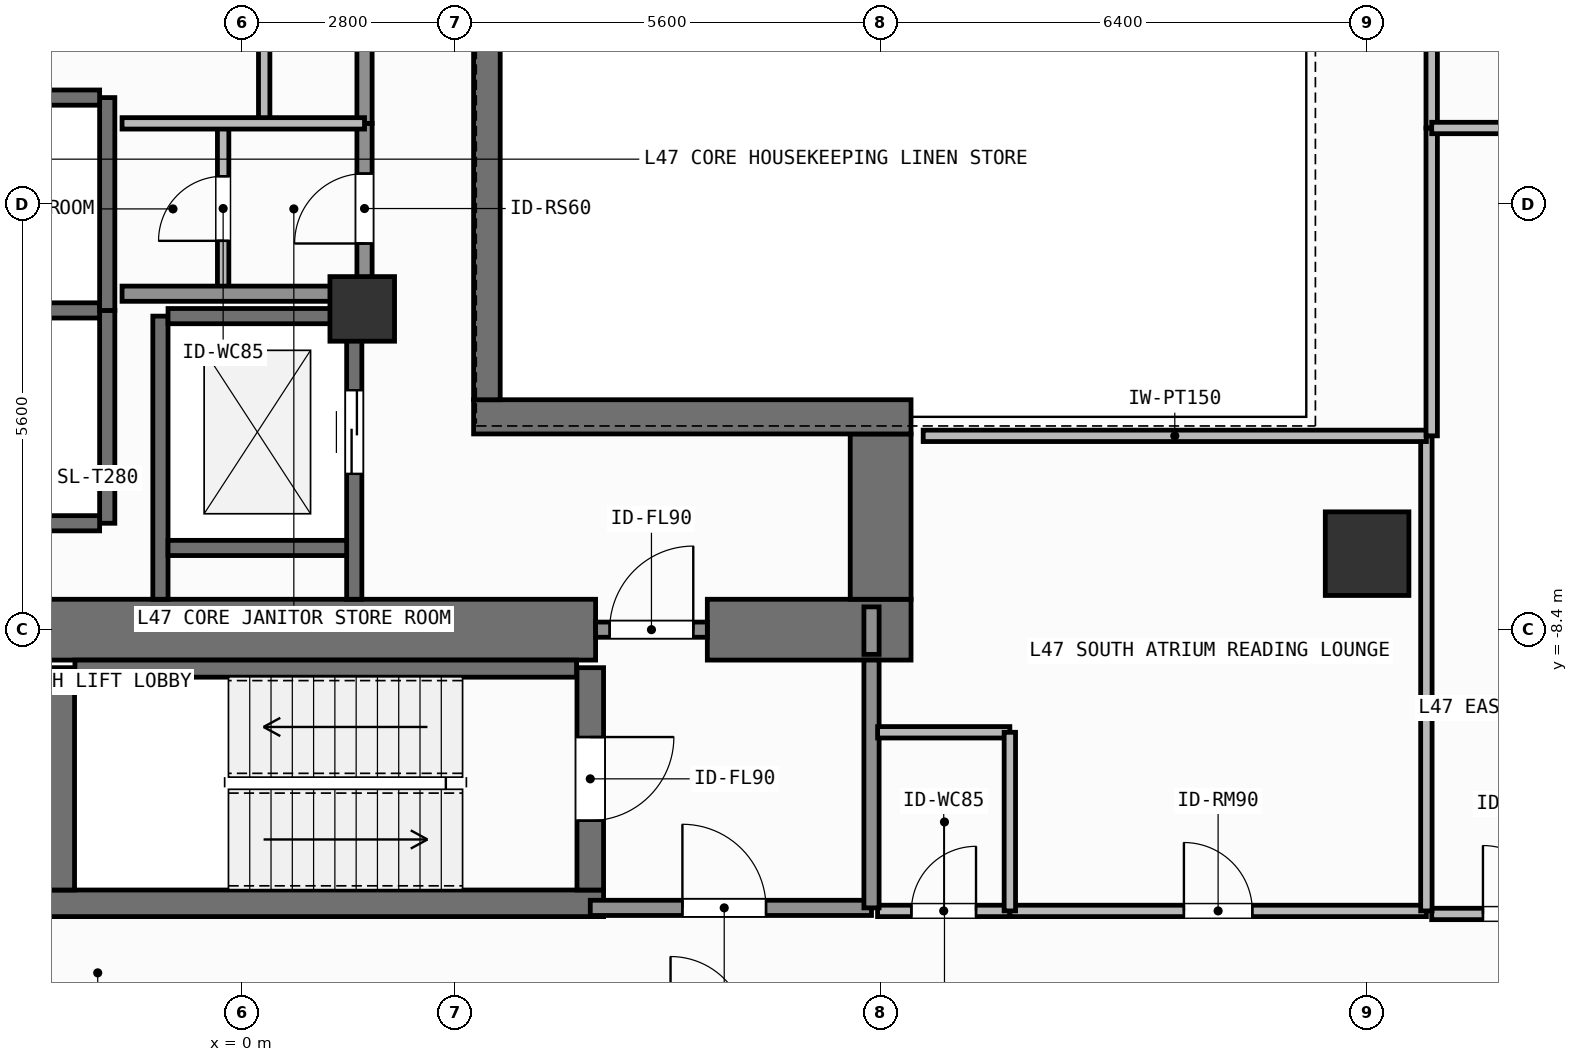
"""IFC4 building model, lengths in metres.
Left out: names, types, materials, properties, quantities, classifications, styles, units other than length and angle.
Written with IfcOpenShell. Run it as: python <this file> out.ifc"""

import sys

from ifc_helpers import new_model, si_unit, direction, frame, frame_2d, origin, origin_2d, place, context, subcontext, project, spatial, rectangle, extrude, element, fill, save


model = new_model("IFC4")
c1 = context("Model", 3, precision=1e-05, world=origin(), true_north=direction((0.0, 1.0)))
c2 = subcontext(c1, "Body", "Model", "MODEL_VIEW")
j1 = project(units=[si_unit("LENGTHUNIT", "METRE"), si_unit("PLANEANGLEUNIT", "RADIAN")], contexts=[c1])
p1 = place(None, origin())
s1 = spatial("IfcSite", under=j1, at=p1, CompositionType="ELEMENT")
p2 = place(p1, origin())
s2 = spatial("IfcBuilding", under=s1, at=p2, CompositionType="ELEMENT")
p3 = place(p2, frame((0.0, 0.0, 191.4)))
s3 = spatial("IfcBuildingStorey", under=s2, at=p3, CompositionType="ELEMENT", Elevation=191.4)
p4 = place(p3, frame((-2.62, -8.4, 0.0), z_axis=(0.0, 0.0, 1.0), x_axis=(1.0, 0.0, 0.0)))
e1 = element("IfcWall", 1, at=p4, inside=s3, PredefinedType="SHEAR", context=c2, shape_type="SweptSolid", body=[
    extrude(rectangle(XDim=7.27, YDim=0.8, at=frame_2d((3.635, 0.0))), origin(), (0.0, 0.0, 1.0), 3.9),
])
p5 = place(p3, frame((6.12, -8.4, 0.0), z_axis=(0.0, 0.0, 1.0), x_axis=(1.0, 0.0, 0.0)))
e2 = element("IfcWall", 2, at=p5, inside=s3, PredefinedType="SHEAR", context=c2, shape_type="SweptSolid", body=[
    extrude(rectangle(XDim=2.68, YDim=0.8, at=frame_2d((1.34, 0.0))), origin(), (0.0, 0.0, 1.0), 3.9),
])
p6 = place(p3, frame((8.4, -8.0, 0.0), z_axis=(0.0, 0.0, 1.0), x_axis=(0.0, 1.0, 0.0)))
e3 = element("IfcWall", 3, at=p6, inside=s3, PredefinedType="SHEAR", context=c2, shape_type="SweptSolid", body=[
    extrude(rectangle(XDim=2.175, YDim=0.8, at=frame_2d((1.087, 0.0))), origin(), (0.0, 0.0, 1.0), 3.9),
])
p7 = place(p3, frame((3.045, -5.6, 0.0), z_axis=(0.0, 0.0, 1.0), x_axis=(1.0, 0.0, 0.0)))
e4 = element("IfcWall", 4, at=p7, inside=s3, PredefinedType="SHEAR", context=c2, shape_type="SweptSolid", body=[
    extrude(rectangle(XDim=5.755, YDim=0.45, at=frame_2d((2.877, 0.0))), origin(), (0.0, 0.0, 1.0), 3.9),
])
p8 = place(p3, frame((3.22, -5.375, 0.0), z_axis=(0.0, 0.0, 1.0), x_axis=(0.0, 1.0, 0.0)))
e5 = element("IfcWall", 5, at=p8, inside=s3, PredefinedType="SHEAR", context=c2, shape_type="SweptSolid", body=[
    extrude(rectangle(XDim=10.75, YDim=0.35, at=frame_2d((5.375, 0.0))), origin(), (0.0, 0.0, 1.0), 3.9),
])
p9 = place(p3, frame((-2.555, -12.0, 0.0), z_axis=(0.0, 0.0, 1.0), x_axis=(1.0, 0.0, 0.0)))
e6 = element("IfcWall", 6, at=p9, inside=s3, PredefinedType="SHEAR", context=c2, shape_type="SweptSolid", body=[
    extrude(rectangle(XDim=7.31, YDim=0.35, at=frame_2d((3.655, 0.0))), origin(), (0.0, 0.0, 1.0), 3.9),
])
p10 = place(p3, frame((-2.2, -8.913, 0.0), z_axis=(0.0, 0.0, 1.0), x_axis=(1.0, 0.0, 0.0)))
e7 = element("IfcWall", 7, at=p10, inside=s3, PredefinedType="SHEAR", context=c2, shape_type="SweptSolid", body=[
    extrude(rectangle(XDim=6.6, YDim=0.225, at=frame_2d((3.3, 0.0))), origin(), (0.0, 0.0, 1.0), 3.9),
])
p11 = place(p3, frame((-2.38, -11.825, 0.0), z_axis=(0.0, 0.0, 1.0), x_axis=(0.0, 1.0, 0.0)))
e8 = element("IfcWall", 8, at=p11, inside=s3, PredefinedType="SHEAR", context=c2, shape_type="SweptSolid", body=[
    extrude(rectangle(XDim=2.925, YDim=0.35, at=frame_2d((1.462, 0.0))), origin(), (0.0, 0.0, 1.0), 3.9),
])
p12 = place(p3, frame((4.58, -8.9, 0.0), z_axis=(0.0, 0.0, 1.0), x_axis=(0.0, -1.0, 0.0)))
e9 = element("IfcWall", 9, at=p12, inside=s3, PredefinedType="SHEAR", context=c2, shape_type="SweptSolid", body=[
    extrude(rectangle(XDim=2.925, YDim=0.35, at=frame_2d((1.462, 0.0))), origin(), (0.0, 0.0, 1.0), 3.9),
])
p13 = place(p12, frame((0.913, 0.0, 0.0)))
e10 = element("IfcOpeningElement", 10, at=p13, cuts=e9, PredefinedType="OPENING", context=c2, shape_type="SweptSolid", body=[
    extrude(rectangle(XDim=1.1, YDim=2.15, at=frame_2d((0.55, 1.075))), frame((0.0, 0.185, 0.0), z_axis=(0.0, -1.0, 0.0), x_axis=(1.0, 0.0, 0.0)), (0.0, 0.0, 1.0), 0.37),
])
p14 = place(p3, frame((14.8, -7.4, 0.0), z_axis=(0.0, 0.0, 1.0), x_axis=(1.0, 0.0, 0.0)))
e11 = element("IfcColumn", 11, at=p14, inside=s3, PredefinedType="COLUMN", context=c2, shape_type="SweptSolid", body=[
    extrude(rectangle(XDim=1.1, YDim=1.1, at=origin_2d()), origin(), (0.0, 0.0, 1.0), 3.9),
])
p15 = place(p3, frame((1.58, -4.18, 0.0), z_axis=(0.0, 0.0, 1.0), x_axis=(1.0, 0.0, 0.0)))
e12 = element("IfcColumn", 12, at=p15, inside=s3, PredefinedType="COLUMN", context=c2, shape_type="SweptSolid", body=[
    extrude(rectangle(XDim=0.85, YDim=0.85, at=origin_2d()), origin(), (0.0, 0.0, 1.0), 3.9),
])
p16 = place(p3, frame((-1.775, -7.0, 0.0), z_axis=(0.0, 0.0, 1.0), x_axis=(0.0, 1.0, 0.0)))
e13 = element("IfcWall", 13, at=p16, inside=s3, PredefinedType="SHEAR", context=c2, shape_type="SweptSolid", body=[
    extrude(rectangle(XDim=2.8, YDim=0.2, at=frame_2d((1.4, 0.0))), origin(), (0.0, 0.0, 1.0), 3.68),
])
for number, where, z_axis, x_axis in (
    (14, (-4.325, -7.0, 0.0), (0.0, 0.0, 1.0), (1.0, 0.0, 0.0)),
    (15, (-4.325, -4.2, 0.0), (0.0, 0.0, 1.0), (1.0, 0.0, 0.0)),
):
    element("IfcWall", number, at=place(p3, frame(where, z_axis=z_axis, x_axis=x_axis)), inside=s3, PredefinedType="SHEAR", context=c2, shape_type="SweptSolid", body=[
        extrude(rectangle(XDim=2.45, YDim=0.2, at=frame_2d((1.225, 0.0))), origin(), (0.0, 0.0, 1.0), 3.68),
    ])
p17 = place(p3, frame((-1.775, -4.2, 0.0), z_axis=(0.0, 0.0, 1.0), x_axis=(0.0, 1.0, 0.0)))
e16 = element("IfcWall", 16, at=p17, inside=s3, PredefinedType="SHEAR", context=c2, shape_type="SweptSolid", body=[
    extrude(rectangle(XDim=2.8, YDim=0.2, at=frame_2d((1.4, 0.0))), origin(), (0.0, 0.0, 1.0), 3.68),
])
p18 = place(p3, frame((-4.325, -1.4, 0.0), z_axis=(0.0, 0.0, 1.0), x_axis=(1.0, 0.0, 0.0)))
e17 = element("IfcWall", 17, at=p18, inside=s3, PredefinedType="SHEAR", context=c2, shape_type="SweptSolid", body=[
    extrude(rectangle(XDim=2.45, YDim=0.2, at=frame_2d((1.225, 0.0))), origin(), (0.0, 0.0, 1.0), 3.68),
])
p19 = place(p3, frame((-1.075, -8.0, 0.0), z_axis=(0.0, 0.0, 1.0), x_axis=(0.0, 1.0, 0.0)))
e18 = element("IfcWall", 18, at=p19, inside=s3, PredefinedType="SHEAR", context=c2, shape_type="SweptSolid", body=[
    extrude(rectangle(XDim=3.725, YDim=0.2, at=frame_2d((1.863, 0.0))), origin(), (0.0, 0.0, 1.0), 3.68),
])
p20 = place(p3, frame((1.475, -8.0, 0.0), z_axis=(0.0, 0.0, 1.0), x_axis=(0.0, 1.0, 0.0)))
e19 = element("IfcWall", 19, at=p20, inside=s3, PredefinedType="SHEAR", context=c2, shape_type="SweptSolid", body=[
    extrude(rectangle(XDim=3.725, YDim=0.2, at=frame_2d((1.863, 0.0))), origin(), (0.0, 0.0, 1.0), 3.68),
])
p21 = place(p20, frame((1.65, 0.0, 0.0)))
e20 = element("IfcOpeningElement", 20, at=p21, cuts=e19, PredefinedType="OPENING", context=c2, shape_type="SweptSolid", body=[
    extrude(rectangle(XDim=1.1, YDim=2.2, at=frame_2d((0.55, 1.1))), frame((0.0, 0.11, 0.0), z_axis=(0.0, -1.0, 0.0), x_axis=(1.0, 0.0, 0.0)), (0.0, 0.0, 1.0), 0.22),
])
for number, where, z_axis, x_axis in (
    (21, (-0.975, -7.325, 0.0), (0.0, 0.0, 1.0), (1.0, 0.0, 0.0)),
    (22, (-0.975, -4.275, 0.0), (0.0, 0.0, 1.0), (1.0, 0.0, 0.0)),
):
    element("IfcWall", number, at=place(p3, frame(where, z_axis=z_axis, x_axis=x_axis)), inside=s3, PredefinedType="SHEAR", context=c2, shape_type="SweptSolid", body=[
        extrude(rectangle(XDim=2.35, YDim=0.2, at=frame_2d((1.175, 0.0))), origin(), (0.0, 0.0, 1.0), 3.68),
    ])
p22 = place(p3, frame((4.58, -12.06, 0.0), z_axis=(0.0, 0.0, 1.0), x_axis=(1.0, 0.0, 0.0)))
e23 = element("IfcWall", 23, at=p22, inside=s3, PredefinedType="SOLIDWALL", context=c2, shape_type="SweptSolid", body=[
    extrude(rectangle(XDim=3.7, YDim=0.2, at=frame_2d((1.85, 0.0))), origin(), (0.0, 0.0, 1.0), 3.68),
])
p23 = place(p22, frame((1.212, 0.0, 0.0)))
e24 = element("IfcOpeningElement", 24, at=p23, cuts=e23, PredefinedType="OPENING", context=c2, shape_type="SweptSolid", body=[
    extrude(rectangle(XDim=1.1, YDim=2.15, at=frame_2d((0.55, 1.075))), frame((0.0, 0.11, 0.0), z_axis=(0.0, -1.0, 0.0), x_axis=(1.0, 0.0, 0.0)), (0.0, 0.0, 1.0), 0.22),
])
p24 = place(p3, frame((4.65, -8.4, 0.0), z_axis=(0.0, 0.0, 1.0), x_axis=(1.0, 0.0, 0.0)))
e25 = element("IfcWall", 25, at=p24, inside=s3, PredefinedType="SOLIDWALL", context=c2, shape_type="SweptSolid", body=[
    extrude(rectangle(XDim=1.47, YDim=0.2, at=frame_2d((0.735, 0.0))), origin(), (0.0, 0.0, 1.0), 2.82),
])
p25 = place(p24, frame((0.185, 0.0, 0.0)))
e26 = element("IfcOpeningElement", 26, at=p25, cuts=e25, PredefinedType="OPENING", context=c2, shape_type="SweptSolid", body=[
    extrude(rectangle(XDim=1.1, YDim=2.15, at=frame_2d((0.55, 1.075))), frame((0.0, 0.11, 0.0), z_axis=(0.0, -1.0, 0.0), x_axis=(1.0, 0.0, 0.0)), (0.0, 0.0, 1.0), 0.22),
])
p26 = place(p3, frame((-0.25, -3.98, 0.0), z_axis=(0.0, 0.0, 1.0), x_axis=(0.0, 1.0, 0.0)))
e27 = element("IfcWall", 27, at=p26, inside=s3, PredefinedType="PARTITIONING", context=c2, shape_type="SweptSolid", body=[
    extrude(rectangle(XDim=2.241, YDim=0.15, at=frame_2d((1.121, 0.0))), origin(), (0.0, 0.0, 1.0), 3.68),
])
p27 = place(p26, frame((0.696, 0.0, 0.0)))
e28 = element("IfcOpeningElement", 28, at=p27, cuts=e27, PredefinedType="OPENING", context=c2, shape_type="SweptSolid", body=[
    extrude(rectangle(XDim=0.85, YDim=2.1, at=frame_2d((0.425, 1.05))), frame((0.0, 0.085, 0.0), z_axis=(0.0, -1.0, 0.0), x_axis=(1.0, 0.0, 0.0)), (0.0, 0.0, 1.0), 0.17),
])
p28 = place(p3, frame((0.29, -1.739, 0.0), z_axis=(0.0, 0.0, 1.0), x_axis=(0.0, 1.0, 0.0)))
e29 = element("IfcWall", 29, at=p28, inside=s3, PredefinedType="PARTITIONING", context=c2, shape_type="SweptSolid", body=[
    extrude(rectangle(XDim=3.199, YDim=0.15, at=frame_2d((1.6, 0.0))), origin(), (0.0, 0.0, 1.0), 3.68),
])
p29 = place(p28, frame((1.175, 0.0, 0.0)))
e30 = element("IfcOpeningElement", 30, at=p29, cuts=e29, PredefinedType="OPENING", context=c2, shape_type="SweptSolid", body=[
    extrude(rectangle(XDim=0.85, YDim=2.1, at=frame_2d((0.425, 1.05))), frame((0.0, 0.085, 0.0), z_axis=(0.0, -1.0, 0.0), x_axis=(1.0, 0.0, 0.0)), (0.0, 0.0, 1.0), 0.17),
])
p30 = place(p3, frame((1.61, -3.98, 0.0), z_axis=(0.0, 0.0, 1.0), x_axis=(0.0, 1.0, 0.0)))
e31 = element("IfcWall", 31, at=p30, inside=s3, PredefinedType="SOLIDWALL", context=c2, shape_type="SweptSolid", body=[
    extrude(rectangle(XDim=2.241, YDim=0.2, at=frame_2d((1.121, 0.0))), origin(), (0.0, 0.0, 1.0), 3.68),
])
p31 = place(p30, frame((0.66, 0.0, 0.0)))
e32 = element("IfcOpeningElement", 32, at=p31, cuts=e31, PredefinedType="OPENING", context=c2, shape_type="SweptSolid", body=[
    extrude(rectangle(XDim=0.92, YDim=2.1, at=frame_2d((0.46, 1.05))), frame((0.0, 0.11, 0.0), z_axis=(0.0, -1.0, 0.0), x_axis=(1.0, 0.0, 0.0)), (0.0, 0.0, 1.0), 0.22),
])
p32 = place(p3, frame((1.61, -1.739, 0.0), z_axis=(0.0, 0.0, 1.0), x_axis=(0.0, 1.0, 0.0)))
e33 = element("IfcWall", 33, at=p32, inside=s3, PredefinedType="SOLIDWALL", context=c2, shape_type="SweptSolid", body=[
    extrude(rectangle(XDim=3.199, YDim=0.2, at=frame_2d((1.6, 0.0))), origin(), (0.0, 0.0, 1.0), 3.68),
])
p33 = place(p32, frame((1.175, 0.0, 0.0)))
e34 = element("IfcOpeningElement", 34, at=p33, cuts=e33, PredefinedType="OPENING", context=c2, shape_type="SweptSolid", body=[
    extrude(rectangle(XDim=0.85, YDim=2.1, at=frame_2d((0.425, 1.05))), frame((0.0, 0.11, 0.0), z_axis=(0.0, -1.0, 0.0), x_axis=(1.0, 0.0, 0.0)), (0.0, 0.0, 1.0), 0.22),
])
p34 = place(p3, frame((8.36, -12.1, 0.0), z_axis=(0.0, 0.0, 1.0), x_axis=(1.0, 0.0, 0.0)))
e35 = element("IfcWall", 35, at=p34, inside=s3, PredefinedType="PARTITIONING", context=c2, shape_type="SweptSolid", body=[
    extrude(rectangle(XDim=1.74, YDim=0.15, at=frame_2d((0.87, 0.0))), origin(), (0.0, 0.0, 1.0), 3.68),
])
p35 = place(p34, frame((0.445, 0.0, 0.0)))
e36 = element("IfcOpeningElement", 36, at=p35, cuts=e35, PredefinedType="OPENING", context=c2, shape_type="SweptSolid", body=[
    extrude(rectangle(XDim=0.85, YDim=2.1, at=frame_2d((0.425, 1.05))), frame((0.0, 0.085, 0.0), z_axis=(0.0, -1.0, 0.0), x_axis=(1.0, 0.0, 0.0)), (0.0, 0.0, 1.0), 0.17),
])
p36 = place(p3, frame((10.1, -12.1, 0.0), z_axis=(0.0, 0.0, 1.0), x_axis=(1.0, 0.0, 0.0)))
e37 = element("IfcWall", 37, at=p36, inside=s3, PredefinedType="PARTITIONING", context=c2, shape_type="SweptSolid", body=[
    extrude(rectangle(XDim=5.48, YDim=0.15, at=frame_2d((2.74, 0.0))), origin(), (0.0, 0.0, 1.0), 3.68),
])
p37 = place(p36, frame((2.29, 0.0, 0.0)))
e38 = element("IfcOpeningElement", 38, at=p37, cuts=e37, PredefinedType="OPENING", context=c2, shape_type="SweptSolid", body=[
    extrude(rectangle(XDim=0.9, YDim=2.1, at=frame_2d((0.45, 1.05))), frame((0.0, 0.085, 0.0), z_axis=(0.0, -1.0, 0.0), x_axis=(1.0, 0.0, 0.0)), (0.0, 0.0, 1.0), 0.17),
])
p38 = place(p3, frame((15.65, -12.14, 0.0), z_axis=(0.0, 0.0, 1.0), x_axis=(1.0, 0.0, 0.0)))
e39 = element("IfcWall", 39, at=p38, inside=s3, PredefinedType="PARTITIONING", context=c2, shape_type="SweptSolid", body=[
    extrude(rectangle(XDim=2.42, YDim=0.15, at=frame_2d((1.21, 0.0))), origin(), (0.0, 0.0, 1.0), 3.68),
])
p39 = place(p38, frame((0.674, 0.0, 0.0)))
e40 = element("IfcOpeningElement", 40, at=p39, cuts=e39, PredefinedType="OPENING", context=c2, shape_type="SweptSolid", body=[
    extrude(rectangle(XDim=0.9, YDim=2.1, at=frame_2d((0.45, 1.05))), frame((0.0, 0.085, 0.0), z_axis=(0.0, -1.0, 0.0), x_axis=(1.0, 0.0, 0.0)), (0.0, 0.0, 1.0), 0.17),
])
p40 = place(p3, frame((8.28, -12.06, 0.0), z_axis=(0.0, 0.0, 1.0), x_axis=(0.0, 1.0, 0.0)))
e41 = element("IfcWall", 41, at=p40, inside=s3, PredefinedType="SOLIDWALL", context=c2, shape_type="SweptSolid", body=[
    extrude(rectangle(XDim=3.26, YDim=0.2, at=frame_2d((1.63, 0.0))), origin(), (0.0, 0.0, 1.0), 3.68),
])
p41 = place(p3, frame((-1.58, -3.98, 0.0), z_axis=(0.0, 0.0, 1.0), x_axis=(1.0, 0.0, 0.0)))
e42 = element("IfcWall", 42, at=p41, inside=s3, PredefinedType="SOLIDWALL", context=c2, shape_type="SweptSolid", body=[
    extrude(rectangle(XDim=3.19, YDim=0.2, at=frame_2d((1.595, 0.0))), origin(), (0.0, 0.0, 1.0), 3.68),
])
p42 = place(p3, frame((-1.58, -1.739, 0.0), z_axis=(0.0, 0.0, 1.0), x_axis=(1.0, 0.0, 0.0)))
e43 = element("IfcWall", 43, at=p42, inside=s3, PredefinedType="PARTITIONING", context=c2, shape_type="SweptSolid", body=[
    extrude(rectangle(XDim=3.19, YDim=0.15, at=frame_2d((1.595, 0.0))), origin(), (0.0, 0.0, 1.0), 3.68),
])
p43 = place(p3, frame((8.28, -8.725, 0.0), z_axis=(0.0, 0.0, 1.0), x_axis=(0.0, 1.0, 0.0)))
e44 = element("IfcWall", 44, at=p43, inside=s3, PredefinedType="SOLIDWALL", context=c2, shape_type="SweptSolid", body=[
    extrude(rectangle(XDim=0.625, YDim=0.2, at=frame_2d((0.312, 0.0))), origin(), (0.0, 0.0, 1.0), 3.68),
])
p44 = place(p3, frame((8.36, -9.75, 0.0), z_axis=(0.0, 0.0, 1.0), x_axis=(1.0, 0.0, 0.0)))
e45 = element("IfcWall", 45, at=p44, inside=s3, PredefinedType="PARTITIONING", context=c2, shape_type="SweptSolid", body=[
    extrude(rectangle(XDim=1.74, YDim=0.15, at=frame_2d((0.87, 0.0))), origin(), (0.0, 0.0, 1.0), 3.68),
])
p45 = place(p3, frame((10.1, -12.1, 0.0), z_axis=(0.0, 0.0, 1.0), x_axis=(0.0, 1.0, 0.0)))
e46 = element("IfcWall", 46, at=p45, inside=s3, PredefinedType="PARTITIONING", context=c2, shape_type="SweptSolid", body=[
    extrude(rectangle(XDim=2.35, YDim=0.15, at=frame_2d((1.175, 0.0))), origin(), (0.0, 0.0, 1.0), 3.68),
])
p46 = place(p3, frame((15.58, -12.1, 0.0), z_axis=(0.0, 0.0, 1.0), x_axis=(0.0, 1.0, 0.0)))
e47 = element("IfcWall", 47, at=p46, inside=s3, PredefinedType="PARTITIONING", context=c2, shape_type="SweptSolid", body=[
    extrude(rectangle(XDim=6.25, YDim=0.15, at=frame_2d((3.125, 0.0))), origin(), (0.0, 0.0, 1.0), 3.68),
])
p47 = place(p3, frame((8.96, -5.85, 0.0), z_axis=(0.0, 0.0, 1.0), x_axis=(1.0, 0.0, 0.0)))
e48 = element("IfcWall", 48, at=p47, inside=s3, PredefinedType="PARTITIONING", context=c2, shape_type="SweptSolid", body=[
    extrude(rectangle(XDim=6.62, YDim=0.15, at=frame_2d((3.31, 0.0))), origin(), (0.0, 0.0, 1.0), 3.68),
])
p48 = place(p3, frame((15.65, -5.85, 0.0), z_axis=(0.0, 0.0, 1.0), x_axis=(0.0, 1.0, 0.0)))
e49 = element("IfcWall", 49, at=p48, inside=s3, PredefinedType="PARTITIONING", context=c2, shape_type="SweptSolid", body=[
    extrude(rectangle(XDim=4.05, YDim=0.15, at=frame_2d((2.025, 0.0))), origin(), (0.0, 0.0, 1.0), 3.68),
])
p49 = place(p3, frame((15.65, -1.8, 0.0), z_axis=(0.0, 0.0, 1.0), x_axis=(0.0, 1.0, 0.0)))
e50 = element("IfcWall", 50, at=p49, inside=s3, PredefinedType="PARTITIONING", context=c2, shape_type="SweptSolid", body=[
    extrude(rectangle(XDim=7.65, YDim=0.15, at=frame_2d((3.825, 0.0))), origin(), (0.0, 0.0, 1.0), 3.68),
])
p50 = place(p3, frame((15.65, -1.8, 0.0), z_axis=(0.0, 0.0, 1.0), x_axis=(1.0, 0.0, 0.0)))
e51 = element("IfcWall", 51, at=p50, inside=s3, PredefinedType="PARTITIONING", context=c2, shape_type="SweptSolid", body=[
    extrude(rectangle(XDim=4.68, YDim=0.15, at=frame_2d((2.34, 0.0))), origin(), (0.0, 0.0, 1.0), 3.68),
])
p51 = place(p21, origin())
e52 = element("IfcDoor", 52, at=p51, inside=s3, OperationType="SLIDING_TO_LEFT", PredefinedType="DOOR", context=c2, shape_type="SweptSolid", body=[
    extrude(rectangle(XDim=1.1, YDim=2.2, at=frame_2d((0.55, 1.1))), frame((0.0, 0.025, 0.0), z_axis=(0.0, -1.0, 0.0), x_axis=(1.0, 0.0, 0.0)), (0.0, 0.0, 1.0), 0.05),
])
fill(e20, e52)
p52 = place(p13, origin())
e53 = element("IfcDoor", 53, at=p52, inside=s3, OperationType="SINGLE_SWING_LEFT", PredefinedType="DOOR", context=c2, shape_type="SweptSolid", body=[
    extrude(rectangle(XDim=1.1, YDim=2.15, at=frame_2d((0.55, 1.075))), frame((0.0, 0.025, 0.0), z_axis=(0.0, -1.0, 0.0), x_axis=(1.0, 0.0, 0.0)), (0.0, 0.0, 1.0), 0.05),
])
fill(e10, e53)
p53 = place(p23, origin())
e54 = element("IfcDoor", 54, at=p53, inside=s3, OperationType="SINGLE_SWING_LEFT", PredefinedType="DOOR", context=c2, shape_type="SweptSolid", body=[
    extrude(rectangle(XDim=1.1, YDim=2.15, at=frame_2d((0.55, 1.075))), frame((0.0, 0.025, 0.0), z_axis=(0.0, -1.0, 0.0), x_axis=(1.0, 0.0, 0.0)), (0.0, 0.0, 1.0), 0.05),
])
fill(e24, e54)
p54 = place(p25, origin())
e55 = element("IfcDoor", 55, at=p54, inside=s3, OperationType="SINGLE_SWING_RIGHT", PredefinedType="DOOR", context=c2, shape_type="SweptSolid", body=[
    extrude(rectangle(XDim=1.1, YDim=2.15, at=frame_2d((0.55, 1.075))), frame((0.0, 0.025, 0.0), z_axis=(0.0, -1.0, 0.0), x_axis=(1.0, 0.0, 0.0)), (0.0, 0.0, 1.0), 0.05),
])
fill(e26, e55)
p55 = place(p27, origin())
e56 = element("IfcDoor", 56, at=p55, inside=s3, OperationType="SINGLE_SWING_LEFT", PredefinedType="DOOR", context=c2, shape_type="SweptSolid", body=[
    extrude(rectangle(XDim=0.85, YDim=2.1, at=frame_2d((0.425, 1.05))), frame((0.0, 0.025, 0.0), z_axis=(0.0, -1.0, 0.0), x_axis=(1.0, 0.0, 0.0)), (0.0, 0.0, 1.0), 0.05),
])
fill(e28, e56)
p56 = place(p31, origin())
e57 = element("IfcDoor", 57, at=p56, inside=s3, OperationType="SINGLE_SWING_LEFT", PredefinedType="DOOR", context=c2, shape_type="SweptSolid", body=[
    extrude(rectangle(XDim=0.92, YDim=2.1, at=frame_2d((0.46, 1.05))), frame((0.0, 0.025, 0.0), z_axis=(0.0, -1.0, 0.0), x_axis=(1.0, 0.0, 0.0)), (0.0, 0.0, 1.0), 0.05),
])
fill(e32, e57)
p57 = place(p35, origin())
e58 = element("IfcDoor", 58, at=p57, inside=s3, OperationType="SINGLE_SWING_RIGHT", PredefinedType="DOOR", context=c2, shape_type="SweptSolid", body=[
    extrude(rectangle(XDim=0.85, YDim=2.1, at=frame_2d((0.425, 1.05))), frame((0.0, 0.025, 0.0), z_axis=(0.0, -1.0, 0.0), x_axis=(1.0, 0.0, 0.0)), (0.0, 0.0, 1.0), 0.05),
])
fill(e36, e58)
p58 = place(p37, origin())
e59 = element("IfcDoor", 59, at=p58, inside=s3, OperationType="SINGLE_SWING_LEFT", PredefinedType="DOOR", context=c2, shape_type="SweptSolid", body=[
    extrude(rectangle(XDim=0.9, YDim=2.1, at=frame_2d((0.45, 1.05))), frame((0.0, 0.025, 0.0), z_axis=(0.0, -1.0, 0.0), x_axis=(1.0, 0.0, 0.0)), (0.0, 0.0, 1.0), 0.05),
])
fill(e38, e59)
p59 = place(p39, origin())
e60 = element("IfcDoor", 60, at=p59, inside=s3, OperationType="SINGLE_SWING_LEFT", PredefinedType="DOOR", context=c2, shape_type="SweptSolid", body=[
    extrude(rectangle(XDim=0.9, YDim=2.1, at=frame_2d((0.45, 1.05))), frame((0.0, 0.025, 0.0), z_axis=(0.0, -1.0, 0.0), x_axis=(1.0, 0.0, 0.0)), (0.0, 0.0, 1.0), 0.05),
])
fill(e40, e60)
save(model, sys.argv[1])
